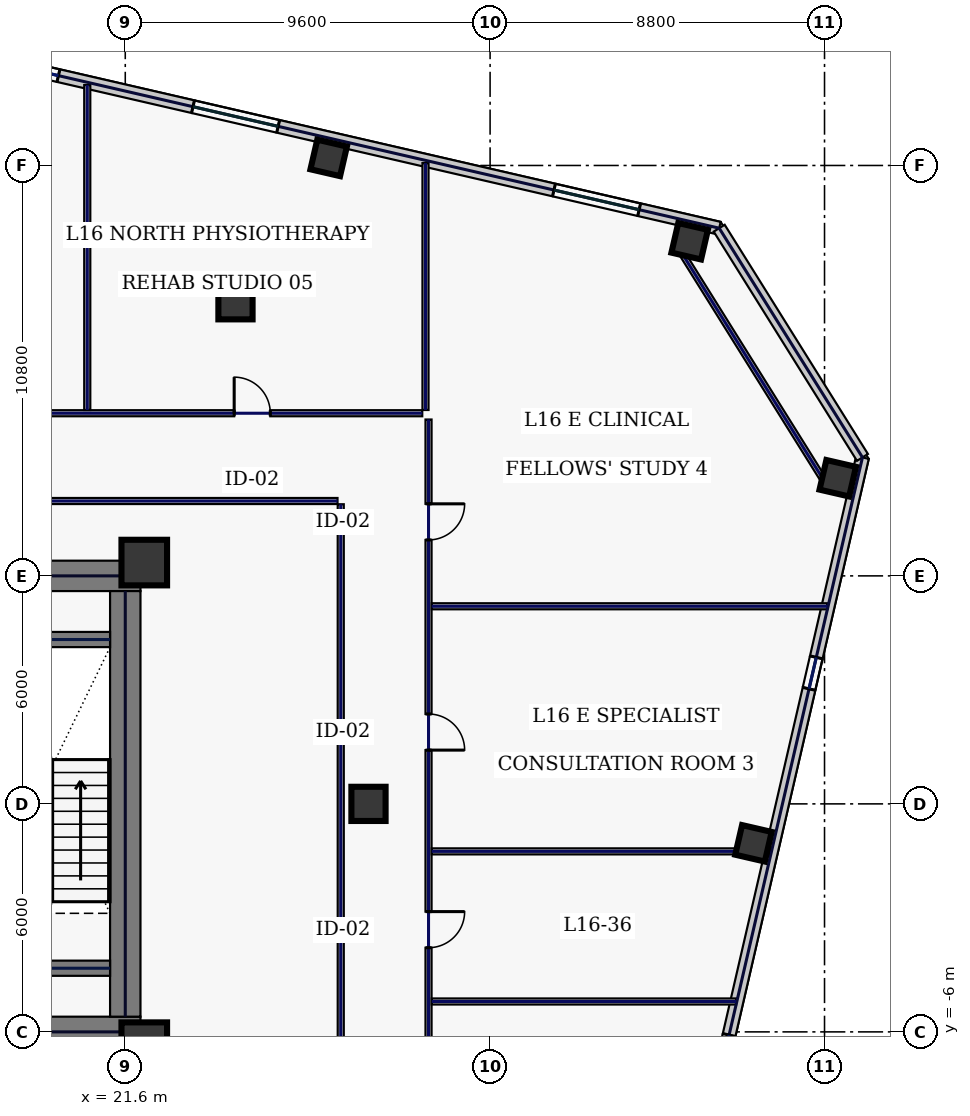
"""IFC4 building model, lengths in metres.
Left out: names, types, materials, properties, quantities, classifications, styles, units other than length and angle.
Written with IfcOpenShell. Run it as: python <this file> out.ifc"""

import sys

from ifc_helpers import new_model, si_unit, direction, frame, frame_2d, origin, origin_2d, place, context, subcontext, project, spatial, rectangle, hollow_rectangle, extrude, element, fill, save


model = new_model("IFC4")
c1 = context("Model", 3, precision=1e-05, world=origin(), true_north=direction((0.0, 1.0)))
c2 = subcontext(c1, "Body", "Model", "MODEL_VIEW")
j1 = project(units=[si_unit("LENGTHUNIT", "METRE"), si_unit("PLANEANGLEUNIT", "RADIAN")], contexts=[c1])
p1 = place(None, origin())
s1 = spatial("IfcSite", under=j1, at=p1, CompositionType="ELEMENT")
p2 = place(p1, origin())
s2 = spatial("IfcBuilding", under=s1, at=p2, CompositionType="ELEMENT")
p3 = place(p2, frame((0.0, 0.0, 75.4)))
s3 = spatial("IfcBuildingStorey", under=s2, at=p3, CompositionType="ELEMENT", Elevation=75.4)
for number, where, z_axis, x_axis in (
    (1, (10.4, 6.0, 0.0), (0.0, 0.0, 1.0), (1.0, 0.0, 0.0)),
    (2, (10.4, -6.0, 0.0), (0.0, 0.0, 1.0), (1.0, 0.0, 0.0)),
):
    element("IfcWall", number, at=place(p3, frame(where, z_axis=z_axis, x_axis=x_axis)), inside=s3, PredefinedType="SHEAR", context=c2, shape_type="SweptSolid", body=[
        extrude(rectangle(XDim=11.6, YDim=0.8, at=frame_2d((5.8, 0.0))), origin(), (0.0, 0.0, 1.0), 3.74),
    ])
p4 = place(p3, frame((21.6, -5.6, 0.0), z_axis=(0.0, 0.0, 1.0), x_axis=(0.0, 1.0, 0.0)))
e3 = element("IfcWall", 3, at=p4, inside=s3, PredefinedType="SHEAR", context=c2, shape_type="SweptSolid", body=[
    extrude(rectangle(XDim=11.2, YDim=0.8, at=frame_2d((5.6, 0.0))), origin(), (0.0, 0.0, 1.0), 3.74),
])
for number, where, z_axis, x_axis in (
    (4, (17.8, -4.325, 0.0), (0.0, 0.0, 1.0), (1.0, 0.0, 0.0)),
    (5, (17.8, 4.325, 0.0), (0.0, 0.0, 1.0), (1.0, 0.0, 0.0)),
):
    element("IfcWall", number, at=place(p3, frame(where, z_axis=z_axis, x_axis=x_axis)), inside=s3, PredefinedType="SHEAR", context=c2, shape_type="SweptSolid", body=[
        extrude(rectangle(XDim=3.4, YDim=0.4, at=frame_2d((1.7, 0.0))), origin(), (0.0, 0.0, 1.0), 3.74),
    ])
for number, where, z_axis, x_axis in (
    (6, (22.1, -6.35, 0.0), (0.0, 0.0, 1.0), (1.0, 0.0, 0.0)),
    (7, (22.1, 6.35, 0.0), (0.0, 0.0, 1.0), (1.0, 0.0, 0.0)),
):
    element("IfcColumn", number, at=place(p3, frame(where, z_axis=z_axis, x_axis=x_axis)), inside=s3, PredefinedType="COLUMN", context=c2, shape_type="SweptSolid", body=[
        extrude(hollow_rectangle(XDim=1.2, YDim=1.2, WallThickness=0.05, at=origin_2d()), origin(), (0.0, 0.0, 1.0), 3.74),
    ])
for number, where, z_axis, x_axis in (
    (8, (24.5, 13.2, 0.0), (0.0, 0.0, 1.0), (1.0, 0.0, 0.0)),
    (9, (28.0, 0.0, 0.0), (0.0, 0.0, 1.0), (1.0, 0.0, 0.0)),
):
    element("IfcColumn", number, at=place(p3, frame(where, z_axis=z_axis, x_axis=x_axis)), inside=s3, PredefinedType="COLUMN", context=c2, shape_type="SweptSolid", body=[
        extrude(hollow_rectangle(XDim=0.9, YDim=0.9, WallThickness=0.04, at=origin_2d()), origin(), (0.0, 0.0, 1.0), 3.74),
    ])
for number, where, z_axis, x_axis in (
    (10, (36.451, 14.806, 0.0), (0.0, 0.0, 1.0), (0.974, -0.225, 0.0)),
    (11, (26.952, 16.999, 0.0), (0.0, 0.0, 1.0), (0.974, -0.225, 0.0)),
    (12, (38.13, -1.038, 0.0), (0.0, 0.0, 1.0), (0.974, -0.225, 0.0)),
    (13, (40.348, 8.57, 0.0), (0.0, 0.0, 1.0), (0.974, -0.225, 0.0)),
):
    element("IfcColumn", number, at=place(p3, frame(where, z_axis=z_axis, x_axis=x_axis)), inside=s3, PredefinedType="COLUMN", context=c2, shape_type="SweptSolid", body=[
        extrude(hollow_rectangle(XDim=0.8, YDim=0.8, WallThickness=0.036, at=origin_2d()), origin(), (0.0, 0.0, 1.0), 3.74),
    ])
p5 = place(p3, frame((37.229, 15.15, 0.0), z_axis=(0.0, 0.0, 1.0), x_axis=(-0.97436993772, 0.224951604723, 0.0)))
e14 = element("IfcWall", 14, at=p5, inside=s3, PredefinedType="STANDARD", context=c2, shape_type="SweptSolid", body=[
    extrude(rectangle(XDim=22.651, YDim=0.34, at=frame_2d((11.326, 0.0))), origin(), (0.0, 0.0, 1.0), 3.74),
])
p6 = place(p5, frame((17.845, 0.0, 0.77)))
e15 = element("IfcOpeningElement", 15, at=p6, cuts=e14, PredefinedType="OPENING", context=c2, shape_type="SweptSolid", body=[
    extrude(rectangle(XDim=0.85, YDim=1.85, at=frame_2d((0.425, 0.925))), frame((0.0, 0.18, 0.0), z_axis=(0.0, -1.0, 0.0), x_axis=(1.0, 0.0, 0.0)), (0.0, 0.0, 1.0), 0.36),
])
p7 = place(p5, frame((11.911, 0.0, 0.77)))
e16 = element("IfcOpeningElement", 16, at=p7, cuts=e14, PredefinedType="OPENING", context=c2, shape_type="SweptSolid", body=[
    extrude(rectangle(XDim=2.3, YDim=2.1, at=frame_2d((1.15, 1.05))), frame((0.0, 0.18, 0.0), z_axis=(0.0, -1.0, 0.0), x_axis=(1.0, 0.0, 0.0)), (0.0, 0.0, 1.0), 0.36),
])
p8 = place(p5, frame((2.162, 0.0, 0.77)))
e17 = element("IfcOpeningElement", 17, at=p8, cuts=e14, PredefinedType="OPENING", context=c2, shape_type="SweptSolid", body=[
    extrude(rectangle(XDim=2.3, YDim=2.1, at=frame_2d((1.15, 1.05))), frame((0.0, 0.18, 0.0), z_axis=(0.0, -1.0, 0.0), x_axis=(1.0, 0.0, 0.0)), (0.0, 0.0, 1.0), 0.36),
])
p9 = place(p3, frame((31.82, -30.637, 0.0), z_axis=(0.0, 0.0, 1.0), x_axis=(0.224949969076, 0.974370315338, 0.0)))
e18 = element("IfcWall", 18, at=p9, inside=s3, PredefinedType="STANDARD", context=c2, shape_type="SweptSolid", body=[
    extrude(rectangle(XDim=40.8, YDim=0.34, at=frame_2d((20.4, 0.0))), origin(), (0.0, 0.0, 1.0), 3.74),
])
p10 = place(p9, frame((4.3, 0.0, 0.58)))
e19 = element("IfcOpeningElement", 19, at=p10, cuts=e18, PredefinedType="OPENING", context=c2, shape_type="SweptSolid", body=[
    extrude(rectangle(XDim=1.6, YDim=2.3, at=frame_2d((0.8, 1.15))), frame((0.0, 0.18, 0.0), z_axis=(0.0, -1.0, 0.0), x_axis=(1.0, 0.0, 0.0)), (0.0, 0.0, 1.0), 0.36),
])
p11 = place(p9, frame((14.5, 0.0, 0.58)))
e20 = element("IfcOpeningElement", 20, at=p11, cuts=e18, PredefinedType="OPENING", context=c2, shape_type="SweptSolid", body=[
    extrude(rectangle(XDim=1.6, YDim=2.3, at=frame_2d((0.8, 1.15))), frame((0.0, 0.18, 0.0), z_axis=(0.0, -1.0, 0.0), x_axis=(1.0, 0.0, 0.0)), (0.0, 0.0, 1.0), 0.36),
])
p12 = place(p9, frame((24.35, 0.0, 0.75)))
e21 = element("IfcOpeningElement", 21, at=p12, cuts=e18, PredefinedType="OPENING", context=c2, shape_type="SweptSolid", body=[
    extrude(rectangle(XDim=0.85, YDim=1.85, at=frame_2d((0.425, 0.925))), frame((0.0, 0.18, 0.0), z_axis=(0.0, -1.0, 0.0), x_axis=(1.0, 0.0, 0.0)), (0.0, 0.0, 1.0), 0.36),
])
p13 = place(p9, frame((34.55, 0.0, 0.75)))
e22 = element("IfcOpeningElement", 22, at=p13, cuts=e18, PredefinedType="OPENING", context=c2, shape_type="SweptSolid", body=[
    extrude(rectangle(XDim=0.85, YDim=1.85, at=frame_2d((0.425, 0.925))), frame((0.0, 0.18, 0.0), z_axis=(0.0, -1.0, 0.0), x_axis=(1.0, 0.0, 0.0)), (0.0, 0.0, 1.0), 0.36),
])
p14 = place(p3, frame((40.998, 9.117, 0.0), z_axis=(0.0, 0.0, 1.0), x_axis=(-0.529921811158, 0.848046504656, 0.0)))
e23 = element("IfcWall", 23, at=p14, inside=s3, PredefinedType="STANDARD", context=c2, shape_type="SweptSolid", body=[
    extrude(rectangle(XDim=7.113, YDim=0.34, at=frame_2d((3.557, 0.0))), origin(), (0.0, 0.0, 1.0), 3.74),
])
p15 = place(p3, frame((40.06, 8.389, 0.0), z_axis=(0.0, 0.0, 1.0), x_axis=(-0.529927317139, 0.848043064089, 0.0)))
e24 = element("IfcWall", 24, at=p15, inside=s3, PredefinedType="PARTITIONING", context=c2, shape_type="SweptSolid", body=[
    extrude(rectangle(XDim=7.354, YDim=0.16, at=frame_2d((3.677, 0.0))), origin(), (0.0, 0.0, 1.0), 3.74),
])
p16 = place(p3, frame((-29.415, 10.28, 0.0), z_axis=(0.0, 0.0, 1.0), x_axis=(1.0, 0.0, 0.0)))
e25 = element("IfcWall", 25, at=p16, inside=s3, PredefinedType="PARTITIONING", context=c2, shape_type="SweptSolid", body=[
    extrude(rectangle(XDim=58.83, YDim=0.16, at=frame_2d((29.415, 0.0))), origin(), (0.0, 0.0, 1.0), 3.74),
])
p17 = place(p16, frame((3.269, 0.0, 0.0)))
e26 = element("IfcOpeningElement", 26, at=p17, cuts=e25, PredefinedType="OPENING", context=c2, shape_type="SweptSolid", body=[
    extrude(rectangle(XDim=0.95, YDim=2.2, at=frame_2d((0.475, 1.1))), frame((0.0, 0.09, 0.0), z_axis=(0.0, -1.0, 0.0), x_axis=(1.0, 0.0, 0.0)), (0.0, 0.0, 1.0), 0.18),
])
p18 = place(p16, frame((10.075, 0.0, 0.0)))
e27 = element("IfcOpeningElement", 27, at=p18, cuts=e25, PredefinedType="OPENING", context=c2, shape_type="SweptSolid", body=[
    extrude(rectangle(XDim=1.3, YDim=2.2, at=frame_2d((0.65, 1.1))), frame((0.0, 0.09, 0.0), z_axis=(0.0, -1.0, 0.0), x_axis=(1.0, 0.0, 0.0)), (0.0, 0.0, 1.0), 0.18),
])
p19 = place(p16, frame((16.875, 0.0, 0.0)))
e28 = element("IfcOpeningElement", 28, at=p19, cuts=e25, PredefinedType="OPENING", context=c2, shape_type="SweptSolid", body=[
    extrude(rectangle(XDim=1.3, YDim=2.2, at=frame_2d((0.65, 1.1))), frame((0.0, 0.09, 0.0), z_axis=(0.0, -1.0, 0.0), x_axis=(1.0, 0.0, 0.0)), (0.0, 0.0, 1.0), 0.18),
])
p20 = place(p16, frame((24.25, 0.0, 0.0)))
e29 = element("IfcOpeningElement", 29, at=p20, cuts=e25, PredefinedType="OPENING", context=c2, shape_type="SweptSolid", body=[
    extrude(rectangle(XDim=1.05, YDim=2.2, at=frame_2d((0.525, 1.1))), frame((0.0, 0.09, 0.0), z_axis=(0.0, -1.0, 0.0), x_axis=(1.0, 0.0, 0.0)), (0.0, 0.0, 1.0), 0.18),
])
p21 = place(p16, frame((31.675, 0.0, 0.0)))
e30 = element("IfcOpeningElement", 30, at=p21, cuts=e25, PredefinedType="OPENING", context=c2, shape_type="SweptSolid", body=[
    extrude(rectangle(XDim=1.3, YDim=2.2, at=frame_2d((0.65, 1.1))), frame((0.0, 0.09, 0.0), z_axis=(0.0, -1.0, 0.0), x_axis=(1.0, 0.0, 0.0)), (0.0, 0.0, 1.0), 0.18),
])
p22 = place(p16, frame((42.525, 0.0, 0.0)))
e31 = element("IfcOpeningElement", 31, at=p22, cuts=e25, PredefinedType="OPENING", context=c2, shape_type="SweptSolid", body=[
    extrude(rectangle(XDim=0.95, YDim=2.2, at=frame_2d((0.475, 1.1))), frame((0.0, 0.09, 0.0), z_axis=(0.0, -1.0, 0.0), x_axis=(1.0, 0.0, 0.0)), (0.0, 0.0, 1.0), 0.18),
])
p23 = place(p16, frame((53.881, 0.0, 0.0)))
e32 = element("IfcOpeningElement", 32, at=p23, cuts=e25, PredefinedType="OPENING", context=c2, shape_type="SweptSolid", body=[
    extrude(rectangle(XDim=0.95, YDim=2.2, at=frame_2d((0.475, 1.1))), frame((0.0, 0.09, 0.0), z_axis=(0.0, -1.0, 0.0), x_axis=(1.0, 0.0, 0.0)), (0.0, 0.0, 1.0), 0.18),
])
p24 = place(p3, frame((29.58, 10.115, 0.0), z_axis=(0.0, 0.0, 1.0), x_axis=(0.0, -1.0, 0.0)))
e33 = element("IfcWall", 33, at=p24, inside=s3, PredefinedType="PARTITIONING", context=c2, shape_type="SweptSolid", body=[
    extrude(rectangle(XDim=20.13, YDim=0.16, at=frame_2d((10.065, 0.0))), origin(), (0.0, 0.0, 1.0), 3.74),
])
p25 = place(p24, frame((17.181, 0.0, 0.0)))
e34 = element("IfcOpeningElement", 34, at=p25, cuts=e33, PredefinedType="OPENING", context=c2, shape_type="SweptSolid", body=[
    extrude(rectangle(XDim=0.95, YDim=2.2, at=frame_2d((0.475, 1.1))), frame((0.0, 0.09, 0.0), z_axis=(0.0, -1.0, 0.0), x_axis=(1.0, 0.0, 0.0)), (0.0, 0.0, 1.0), 0.18),
])
p26 = place(p24, frame((12.95, 0.0, 0.0)))
e35 = element("IfcOpeningElement", 35, at=p26, cuts=e33, PredefinedType="OPENING", context=c2, shape_type="SweptSolid", body=[
    extrude(rectangle(XDim=0.95, YDim=2.2, at=frame_2d((0.475, 1.1))), frame((0.0, 0.09, 0.0), z_axis=(0.0, -1.0, 0.0), x_axis=(1.0, 0.0, 0.0)), (0.0, 0.0, 1.0), 0.18),
])
p27 = place(p24, frame((7.75, 0.0, 0.0)))
e36 = element("IfcOpeningElement", 36, at=p27, cuts=e33, PredefinedType="OPENING", context=c2, shape_type="SweptSolid", body=[
    extrude(rectangle(XDim=0.95, YDim=2.2, at=frame_2d((0.475, 1.1))), frame((0.0, 0.09, 0.0), z_axis=(0.0, -1.0, 0.0), x_axis=(1.0, 0.0, 0.0)), (0.0, 0.0, 1.0), 0.18),
])
p28 = place(p24, frame((2.219, 0.0, 0.0)))
e37 = element("IfcOpeningElement", 37, at=p28, cuts=e33, PredefinedType="OPENING", context=c2, shape_type="SweptSolid", body=[
    extrude(rectangle(XDim=0.95, YDim=2.2, at=frame_2d((0.475, 1.1))), frame((0.0, 0.09, 0.0), z_axis=(0.0, -1.0, 0.0), x_axis=(1.0, 0.0, 0.0)), (0.0, 0.0, 1.0), 0.18),
])
p29 = place(p3, frame((27.185, 7.97, 0.0), z_axis=(0.0, 0.0, 1.0), x_axis=(-1.0, 0.0, 0.0)))
e38 = element("IfcWall", 38, at=p29, inside=s3, PredefinedType="PARTITIONING", context=c2, shape_type="SweptSolid", body=[
    extrude(rectangle(XDim=16.52, YDim=0.16, at=frame_2d((8.26, 0.0))), origin(), (0.0, 0.0, 1.0), 3.74),
])
p30 = place(p3, frame((27.27, -7.785, 0.0), z_axis=(0.0, 0.0, 1.0), x_axis=(0.0, 1.0, 0.0)))
e39 = element("IfcWall", 39, at=p30, inside=s3, PredefinedType="PARTITIONING", context=c2, shape_type="SweptSolid", body=[
    extrude(rectangle(XDim=15.67, YDim=0.16, at=frame_2d((7.835, 0.0))), origin(), (0.0, 0.0, 1.0), 3.74),
])
p31 = place(p3, frame((29.5, 10.365, 0.0), z_axis=(0.0, 0.0, 1.0), x_axis=(0.0, 1.0, 0.0)))
e40 = element("IfcWall", 40, at=p31, inside=s3, PredefinedType="PARTITIONING", context=c2, shape_type="SweptSolid", body=[
    extrude(rectangle(XDim=6.497, YDim=0.16, at=frame_2d((3.249, 0.0))), origin(), (0.0, 0.0, 1.0), 3.74),
])
p32 = place(p3, frame((20.6, 10.365, 0.0), z_axis=(0.0, 0.0, 1.0), x_axis=(0.0, 1.0, 0.0)))
e41 = element("IfcWall", 41, at=p32, inside=s3, PredefinedType="PARTITIONING", context=c2, shape_type="SweptSolid", body=[
    extrude(rectangle(XDim=8.552, YDim=0.16, at=frame_2d((4.276, 0.0))), origin(), (0.0, 0.0, 1.0), 3.74),
])
p33 = place(p3, frame((29.665, -5.2, 0.0), z_axis=(0.0, 0.0, 1.0), x_axis=(1.0, 0.0, 0.0)))
e42 = element("IfcWall", 42, at=p33, inside=s3, PredefinedType="PARTITIONING", context=c2, shape_type="SweptSolid", body=[
    extrude(rectangle(XDim=8.007, YDim=0.16, at=frame_2d((4.003, 0.0))), origin(), (0.0, 0.0, 1.0), 3.74),
])
p34 = place(p3, frame((29.665, -1.25, 0.0), z_axis=(0.0, 0.0, 1.0), x_axis=(1.0, 0.0, 0.0)))
e43 = element("IfcWall", 43, at=p34, inside=s3, PredefinedType="PARTITIONING", context=c2, shape_type="SweptSolid", body=[
    extrude(rectangle(XDim=8.919, YDim=0.16, at=frame_2d((4.459, 0.0))), origin(), (0.0, 0.0, 1.0), 3.74),
])
p35 = place(p3, frame((29.665, 5.2, 0.0), z_axis=(0.0, 0.0, 1.0), x_axis=(1.0, 0.0, 0.0)))
e44 = element("IfcWall", 44, at=p35, inside=s3, PredefinedType="PARTITIONING", context=c2, shape_type="SweptSolid", body=[
    extrude(rectangle(XDim=10.408, YDim=0.16, at=frame_2d((5.204, 0.0))), origin(), (0.0, 0.0, 1.0), 3.74),
])
p36 = place(p6, origin())
e45 = element("IfcWindow", 45, at=p36, inside=s3, PartitioningType="SINGLE_PANEL", PredefinedType="WINDOW", context=c2, shape_type="SweptSolid", body=[
    extrude(rectangle(XDim=0.85, YDim=1.85, at=frame_2d((0.425, 0.925))), frame((0.0, 0.03, 0.0), z_axis=(0.0, -1.0, 0.0), x_axis=(1.0, 0.0, 0.0)), (0.0, 0.0, 1.0), 0.06),
])
fill(e15, e45)
p37 = place(p7, origin())
e46 = element("IfcWindow", 46, at=p37, inside=s3, PartitioningType="SINGLE_PANEL", PredefinedType="WINDOW", context=c2, shape_type="SweptSolid", body=[
    extrude(rectangle(XDim=2.3, YDim=2.1, at=frame_2d((1.15, 1.05))), frame((0.0, 0.03, 0.0), z_axis=(0.0, -1.0, 0.0), x_axis=(1.0, 0.0, 0.0)), (0.0, 0.0, 1.0), 0.06),
])
fill(e16, e46)
p38 = place(p8, origin())
e47 = element("IfcWindow", 47, at=p38, inside=s3, PartitioningType="SINGLE_PANEL", PredefinedType="WINDOW", context=c2, shape_type="SweptSolid", body=[
    extrude(rectangle(XDim=2.3, YDim=2.1, at=frame_2d((1.15, 1.05))), frame((0.0, 0.03, 0.0), z_axis=(0.0, -1.0, 0.0), x_axis=(1.0, 0.0, 0.0)), (0.0, 0.0, 1.0), 0.06),
])
fill(e17, e47)
p39 = place(p12, origin())
e48 = element("IfcWindow", 48, at=p39, inside=s3, PartitioningType="SINGLE_PANEL", PredefinedType="WINDOW", context=c2, shape_type="SweptSolid", body=[
    extrude(rectangle(XDim=0.85, YDim=1.85, at=frame_2d((0.425, 0.925))), frame((0.0, 0.03, 0.0), z_axis=(0.0, -1.0, 0.0), x_axis=(1.0, 0.0, 0.0)), (0.0, 0.0, 1.0), 0.06),
])
fill(e21, e48)
p40 = place(p13, origin())
e49 = element("IfcWindow", 49, at=p40, inside=s3, PartitioningType="SINGLE_PANEL", PredefinedType="WINDOW", context=c2, shape_type="SweptSolid", body=[
    extrude(rectangle(XDim=0.85, YDim=1.85, at=frame_2d((0.425, 0.925))), frame((0.0, 0.03, 0.0), z_axis=(0.0, -1.0, 0.0), x_axis=(1.0, 0.0, 0.0)), (0.0, 0.0, 1.0), 0.06),
])
fill(e22, e49)
p41 = place(p23, origin())
e50 = element("IfcDoor", 50, at=p41, inside=s3, OperationType="SINGLE_SWING_LEFT", PredefinedType="DOOR", context=c2, shape_type="SweptSolid", body=[
    extrude(rectangle(XDim=0.95, YDim=2.2, at=frame_2d((0.475, 1.1))), frame((0.0, 0.025, 0.0), z_axis=(0.0, -1.0, 0.0), x_axis=(1.0, 0.0, 0.0)), (0.0, 0.0, 1.0), 0.05),
])
fill(e32, e50)
p42 = place(p26, origin())
e51 = element("IfcDoor", 51, at=p42, inside=s3, OperationType="SINGLE_SWING_LEFT", PredefinedType="DOOR", context=c2, shape_type="SweptSolid", body=[
    extrude(rectangle(XDim=0.95, YDim=2.2, at=frame_2d((0.475, 1.1))), frame((0.0, 0.025, 0.0), z_axis=(0.0, -1.0, 0.0), x_axis=(1.0, 0.0, 0.0)), (0.0, 0.0, 1.0), 0.05),
])
fill(e35, e51)
p43 = place(p27, origin())
e52 = element("IfcDoor", 52, at=p43, inside=s3, OperationType="SINGLE_SWING_RIGHT", PredefinedType="DOOR", context=c2, shape_type="SweptSolid", body=[
    extrude(rectangle(XDim=0.95, YDim=2.2, at=frame_2d((0.475, 1.1))), frame((0.0, 0.025, 0.0), z_axis=(0.0, -1.0, 0.0), x_axis=(1.0, 0.0, 0.0)), (0.0, 0.0, 1.0), 0.05),
])
fill(e36, e52)
p44 = place(p28, origin())
e53 = element("IfcDoor", 53, at=p44, inside=s3, OperationType="SINGLE_SWING_LEFT", PredefinedType="DOOR", context=c2, shape_type="SweptSolid", body=[
    extrude(rectangle(XDim=0.95, YDim=2.2, at=frame_2d((0.475, 1.1))), frame((0.0, 0.025, 0.0), z_axis=(0.0, -1.0, 0.0), x_axis=(1.0, 0.0, 0.0)), (0.0, 0.0, 1.0), 0.05),
])
fill(e37, e53)
save(model, sys.argv[1])
